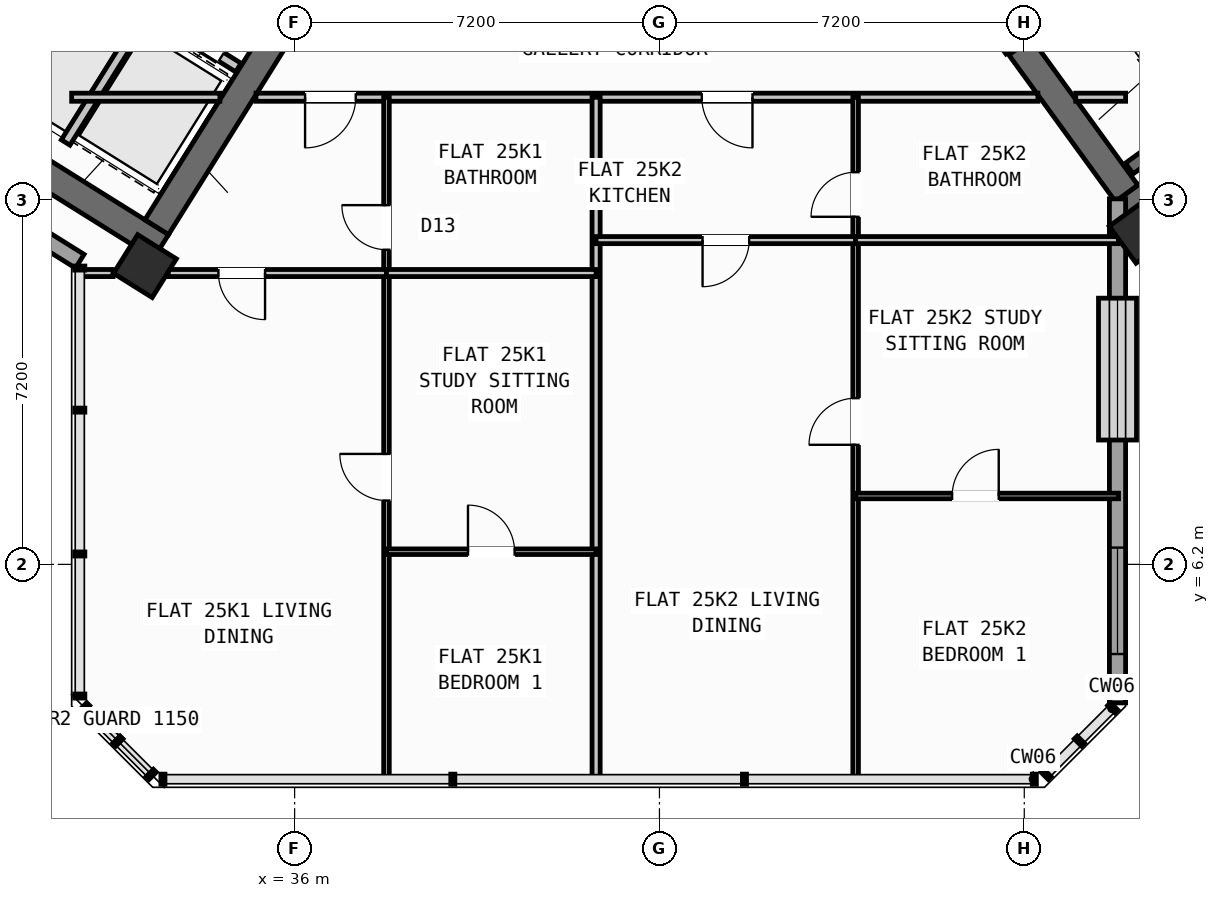
"""IFC4 building model, lengths in metres.
Left out: names, types, materials, properties, quantities, classifications, styles, units other than length and angle.
Written with IfcOpenShell. Run it as: python <this file> out.ifc"""

import sys

from ifc_helpers import new_model, si_unit, direction, frame, frame_2d, origin, origin_2d, place, context, subcontext, project, spatial, rectangle, hollow_rectangle, extrude, source, transform, mapped, element, fill, save


model = new_model("IFC4")
c1 = context("Model", 3, precision=1e-05, world=origin(), true_north=direction((0.0, 1.0)))
c2 = subcontext(c1, "Body", "Model", "MODEL_VIEW")
j1 = project(units=[si_unit("LENGTHUNIT", "METRE"), si_unit("PLANEANGLEUNIT", "RADIAN")], contexts=[c1])
p1 = place(None, origin())
s1 = spatial("IfcSite", under=j1, at=p1, CompositionType="ELEMENT")
p2 = place(p1, origin())
s2 = spatial("IfcBuilding", under=s1, at=p2, CompositionType="ELEMENT")
p3 = place(p2, frame((0.0, 0.0, 100.8)))
s3 = spatial("IfcBuildingStorey", under=s2, at=p3, CompositionType="ELEMENT", Elevation=100.8)
p4 = place(p3, frame((33.366, 12.477, 0.0), z_axis=(0.0, 0.0, 1.0), x_axis=(-0.848047359947, 0.529920442413, 0.0)))
e1 = element("IfcWall", 1, at=p4, inside=s3, PredefinedType="SHEAR", context=c2, shape_type="SweptSolid", body=[
    extrude(rectangle(XDim=13.14, YDim=0.55, at=frame_2d((6.57, 0.0))), origin(), (0.0, 0.0, 1.0), 4.25),
])
p5 = place(p3, frame((36.683, 18.304, 0.0), z_axis=(0.0, 0.0, 1.0), x_axis=(-0.529896466841, -0.848062341122, 0.0)))
e2 = element("IfcWall", 2, at=p5, inside=s3, PredefinedType="SHEAR", context=c2, shape_type="SweptSolid", body=[
    extrude(rectangle(XDim=6.425, YDim=0.55, at=frame_2d((3.212, 0.0))), origin(), (0.0, 0.0, 1.0), 4.25),
])
p6 = place(p3, frame((52.359, 13.14, 0.0), z_axis=(0.0, 0.0, 1.0), x_axis=(0.809014896919, 0.587788139183, 0.0)))
e3 = element("IfcWall", 3, at=p6, inside=s3, PredefinedType="SHEAR", context=c2, shape_type="SweptSolid", body=[
    extrude(rectangle(XDim=12.34, YDim=0.55, at=frame_2d((6.17, 0.0))), origin(), (0.0, 0.0, 1.0), 4.25),
])
p7 = place(p3, frame((52.42, 13.524, 0.0), z_axis=(0.0, 0.0, 1.0), x_axis=(-0.587802113096, 0.809004744015, 0.0)))
e4 = element("IfcWall", 4, at=p7, inside=s3, PredefinedType="SHEAR", context=c2, shape_type="SweptSolid", body=[
    extrude(rectangle(XDim=3.575, YDim=0.55, at=frame_2d((1.788, 0.0))), origin(), (0.0, 0.0, 1.0), 4.25),
])
m1 = source(origin(), c2, "Body", "SweptSolid", [
    extrude(hollow_rectangle(XDim=0.9, YDim=0.9, WallThickness=0.036, at=origin_2d()), origin(), (0.0, 0.0, 1.0), 4.5),
])
for number, where, z_axis, x_axis in (
    (5, (33.046, 12.087, 0.0), (0.0, 0.0, 1.0), (-0.848, 0.53, 0.0)),
    (6, (52.705, 12.773, 0.0), (0.0, 0.0, 1.0), (0.809, 0.588, 0.0)),
):
    element("IfcColumn", number, at=place(p3, frame(where, z_axis=z_axis, x_axis=x_axis)), inside=s3, PredefinedType="COLUMN", context=c2, shape_type="MappedRepresentation", body=[
        mapped(m1, transform((0.0, 0.0, 0.0), scale=1.0)),
    ])
p8 = place(p3, frame((31.76, 12.183, 0.0), z_axis=(0.0, 0.0, 1.0), x_axis=(-0.848047074256, 0.529920899612, 0.0)))
e7 = element("IfcWall", 7, at=p8, inside=s3, PredefinedType="STANDARD", context=c2, shape_type="SweptSolid", body=[
    extrude(rectangle(XDim=30.652, YDim=0.32, at=frame_2d((15.326, 0.0))), origin(), (0.0, 0.0, 1.0), 4.25),
])
p9 = place(p8, frame((15.153, 0.0, 0.0)))
e8 = element("IfcOpeningElement", 8, at=p9, cuts=e7, PredefinedType="OPENING", context=c2, shape_type="SweptSolid", body=[
    extrude(rectangle(XDim=1.2, YDim=2.15, at=frame_2d((0.6, 1.075))), frame((0.0, 0.17, 0.0), z_axis=(0.0, -1.0, 0.0), x_axis=(1.0, 0.0, 0.0)), (0.0, 0.0, 1.0), 0.34),
])
p10 = place(p8, frame((1.652, 0.0, 0.65)))
e9 = element("IfcOpeningElement", 9, at=p10, cuts=e7, PredefinedType="OPENING", context=c2, shape_type="SweptSolid", body=[
    extrude(rectangle(XDim=2.8, YDim=2.1, at=frame_2d((1.4, 1.05))), frame((0.0, 0.17, 0.0), z_axis=(0.0, -1.0, 0.0), x_axis=(1.0, 0.0, 0.0)), (0.0, 0.0, 1.0), 0.34),
])
p11 = place(p8, frame((6.856, 0.0, 0.65)))
e10 = element("IfcOpeningElement", 10, at=p11, cuts=e7, PredefinedType="OPENING", context=c2, shape_type="SweptSolid", body=[
    extrude(rectangle(XDim=2.8, YDim=2.1, at=frame_2d((1.4, 1.05))), frame((0.0, 0.17, 0.0), z_axis=(0.0, -1.0, 0.0), x_axis=(1.0, 0.0, 0.0)), (0.0, 0.0, 1.0), 0.34),
])
p12 = place(p8, frame((20.478, 0.0, 0.85)))
e11 = element("IfcOpeningElement", 11, at=p12, cuts=e7, PredefinedType="OPENING", context=c2, shape_type="SweptSolid", body=[
    extrude(rectangle(XDim=1.5, YDim=1.5, at=frame_2d((0.75, 0.75))), frame((0.0, 0.17, 0.0), z_axis=(0.0, -1.0, 0.0), x_axis=(1.0, 0.0, 0.0)), (0.0, 0.0, 1.0), 0.34),
])
p13 = place(p8, frame((26.258, 0.0, 0.65)))
e12 = element("IfcOpeningElement", 12, at=p13, cuts=e7, PredefinedType="OPENING", context=c2, shape_type="SweptSolid", body=[
    extrude(rectangle(XDim=2.8, YDim=2.1, at=frame_2d((1.4, 1.05))), frame((0.0, 0.17, 0.0), z_axis=(0.0, -1.0, 0.0), x_axis=(1.0, 0.0, 0.0)), (0.0, 0.0, 1.0), 0.34),
])
p14 = place(p3, frame((52.24, 13.414, 0.0), z_axis=(0.0, 0.0, 1.0), x_axis=(0.0, -1.0, 0.0)))
e13 = element("IfcWall", 13, at=p14, inside=s3, PredefinedType="STANDARD", context=c2, shape_type="SweptSolid", body=[
    extrude(rectangle(XDim=9.948, YDim=0.32, at=frame_2d((4.974, 0.0))), origin(), (0.0, 0.0, 1.0), 4.25),
])
p15 = place(p14, frame((1.96, 0.0, 0.65)))
e14 = element("IfcOpeningElement", 14, at=p15, cuts=e13, PredefinedType="OPENING", context=c2, shape_type="SweptSolid", body=[
    extrude(rectangle(XDim=2.8, YDim=2.1, at=frame_2d((1.4, 1.05))), frame((0.0, 0.17, 0.0), z_axis=(0.0, -1.0, 0.0), x_axis=(1.0, 0.0, 0.0)), (0.0, 0.0, 1.0), 0.34),
])
p16 = place(p14, frame((6.883, 0.0, 0.8)))
e15 = element("IfcOpeningElement", 15, at=p16, cuts=e13, PredefinedType="OPENING", context=c2, shape_type="SweptSolid", body=[
    extrude(rectangle(XDim=2.1, YDim=1.55, at=frame_2d((1.05, 0.775))), frame((0.0, 0.17, 0.0), z_axis=(0.0, -1.0, 0.0), x_axis=(1.0, 0.0, 0.0)), (0.0, 0.0, 1.0), 0.34),
])
p17 = place(p3, frame((31.288, 18.256, 0.0), z_axis=(0.0, 0.0, 1.0), x_axis=(-0.529943379326, -0.848033026897, 0.0)))
e16 = element("IfcWall", 16, at=p17, inside=s3, PredefinedType="SHEAR", context=c2, shape_type="SweptSolid", body=[
    extrude(rectangle(XDim=3.16, YDim=0.26, at=frame_2d((1.58, 0.0))), origin(), (0.0, 0.0, 1.0), 4.25),
])
p18 = place(p3, frame((34.891, 16.005, 0.0), z_axis=(0.0, 0.0, 1.0), x_axis=(-0.848062873452, 0.529895614884, 0.0)))
e17 = element("IfcWall", 17, at=p18, inside=s3, PredefinedType="STANDARD", context=c2, shape_type="SweptSolid", body=[
    extrude(rectangle(XDim=4.248, YDim=0.2, at=frame_2d((2.124, 0.0))), origin(), (0.0, 0.0, 1.0), 4.24),
])
p19 = place(p18, frame((0.398, 0.0, 0.0)))
e18 = element("IfcOpeningElement", 18, at=p19, cuts=e17, PredefinedType="OPENING", context=c2, shape_type="SweptSolid", body=[
    extrude(rectangle(XDim=1.3, YDim=2.2, at=frame_2d((0.65, 1.1))), frame((0.0, 0.11, 0.0), z_axis=(0.0, -1.0, 0.0), x_axis=(1.0, 0.0, 0.0)), (0.0, 0.0, 1.0), 0.22),
])
p20 = place(p18, frame((2.473, 0.0, 0.0)))
e19 = element("IfcOpeningElement", 19, at=p20, cuts=e17, PredefinedType="OPENING", context=c2, shape_type="SweptSolid", body=[
    extrude(rectangle(XDim=1.45, YDim=2.25, at=frame_2d((0.725, 1.125))), frame((0.0, 0.11, 0.0), z_axis=(0.0, -1.0, 0.0), x_axis=(1.0, 0.0, 0.0)), (0.0, 0.0, 1.0), 0.22),
])
p21 = place(p3, frame((33.029, 17.003, 0.0), z_axis=(0.0, 0.0, 1.0), x_axis=(-0.529916267533, -0.848049968695, 0.0)))
e20 = element("IfcWall", 20, at=p21, inside=s3, PredefinedType="STANDARD", context=c2, shape_type="SweptSolid", body=[
    extrude(rectangle(XDim=2.92, YDim=0.2, at=frame_2d((1.46, 0.0))), origin(), (0.0, 0.0, 1.0), 4.24),
])
p22 = place(p3, frame((52.472, 14.013, 0.0), z_axis=(0.0, 0.0, 1.0), x_axis=(0.809028366311, 0.587769599847, 0.0)))
e21 = element("IfcWall", 21, at=p22, inside=s3, PredefinedType="SHEAR", context=c2, shape_type="SweptSolid", body=[
    extrude(rectangle(XDim=7.33, YDim=0.26, at=frame_2d((3.665, 0.0))), origin(), (0.0, 0.0, 1.0), 4.25),
])
p23 = place(p3, frame((31.6, 15.42, 0.0), z_axis=(0.0, 0.0, 1.0), x_axis=(1.0, 0.0, 0.0)))
e22 = element("IfcWall", 22, at=p23, inside=s3, PredefinedType="PARTITIONING", context=c2, shape_type="SweptSolid", body=[
    extrude(rectangle(XDim=2.925, YDim=0.16, at=frame_2d((1.462, 0.0))), origin(), (0.0, 0.0, 1.0), 4.24),
])
p24 = place(p3, frame((35.237, 15.42, 0.0), z_axis=(0.0, 0.0, 1.0), x_axis=(1.0, 0.0, 0.0)))
e23 = element("IfcWall", 23, at=p24, inside=s3, PredefinedType="PARTITIONING", context=c2, shape_type="SweptSolid", body=[
    extrude(rectangle(XDim=15.432, YDim=0.16, at=frame_2d((7.716, 0.0))), origin(), (0.0, 0.0, 1.0), 4.24),
])
p25 = place(p24, frame((0.969, 0.0, 0.0)))
e24 = element("IfcOpeningElement", 24, at=p25, cuts=e23, PredefinedType="OPENING", context=c2, shape_type="SweptSolid", body=[
    extrude(rectangle(XDim=1.0, YDim=2.1, at=frame_2d((0.5, 1.05))), frame((0.0, 0.09, 0.0), z_axis=(0.0, -1.0, 0.0), x_axis=(1.0, 0.0, 0.0)), (0.0, 0.0, 1.0), 0.18),
])
p26 = place(p24, frame((8.799, 0.0, 0.0)))
e25 = element("IfcOpeningElement", 25, at=p26, cuts=e23, PredefinedType="OPENING", context=c2, shape_type="SweptSolid", body=[
    extrude(rectangle(XDim=1.0, YDim=2.1, at=frame_2d((0.5, 1.05))), frame((0.0, 0.09, 0.0), z_axis=(0.0, -1.0, 0.0), x_axis=(1.0, 0.0, 0.0)), (0.0, 0.0, 1.0), 0.18),
])
p27 = place(p3, frame((51.416, 15.42, 0.0), z_axis=(0.0, 0.0, 1.0), x_axis=(1.0, 0.0, 0.0)))
e26 = element("IfcWall", 26, at=p27, inside=s3, PredefinedType="PARTITIONING", context=c2, shape_type="SweptSolid", body=[
    extrude(rectangle(XDim=0.984, YDim=0.16, at=frame_2d((0.492, 0.0))), origin(), (0.0, 0.0, 1.0), 4.24),
])
p28 = place(p3, frame((50.119, 16.333, 0.0), z_axis=(0.0, 0.0, 1.0), x_axis=(-0.587749856981, 0.809042709391, 0.0)))
e27 = element("IfcWall", 27, at=p28, inside=s3, PredefinedType="STANDARD", context=c2, shape_type="SweptSolid", body=[
    extrude(rectangle(XDim=2.96, YDim=0.2, at=frame_2d((1.48, 0.0))), origin(), (0.0, 0.0, 1.0), 4.24),
])
p29 = place(p28, frame((0.53, 0.0, 0.0)))
e28 = element("IfcOpeningElement", 28, at=p29, cuts=e27, PredefinedType="OPENING", context=c2, shape_type="SweptSolid", body=[
    extrude(rectangle(XDim=1.5, YDim=2.15, at=frame_2d((0.75, 1.075))), frame((0.0, 0.11, 0.0), z_axis=(0.0, -1.0, 0.0), x_axis=(1.0, 0.0, 0.0)), (0.0, 0.0, 1.0), 0.22),
])
p30 = place(p3, frame((41.95, 1.96, 0.0), z_axis=(0.0, 0.0, 1.0), x_axis=(0.0, 1.0, 0.0)))
e29 = element("IfcWall", 29, at=p30, inside=s3, PredefinedType="PARTITIONING", context=c2, shape_type="SweptSolid", body=[
    extrude(rectangle(XDim=13.46, YDim=0.16, at=frame_2d((6.73, 0.0))), origin(), (0.0, 0.0, 1.0), 4.24),
])
p31 = place(p3, frame((37.813, 1.96, 0.0), z_axis=(0.0, 0.0, 1.0), x_axis=(0.0, 1.0, 0.0)))
e30 = element("IfcWall", 30, at=p31, inside=s3, PredefinedType="PARTITIONING", context=c2, shape_type="SweptSolid", body=[
    extrude(rectangle(XDim=13.46, YDim=0.11, at=frame_2d((6.73, 0.0))), origin(), (0.0, 0.0, 1.0), 4.24),
])
p32 = place(p31, frame((5.5, 0.0, 0.0)))
e31 = element("IfcOpeningElement", 31, at=p32, cuts=e30, PredefinedType="OPENING", context=c2, shape_type="SweptSolid", body=[
    extrude(rectangle(XDim=0.92, YDim=2.08, at=frame_2d((0.46, 1.04))), frame((0.0, 0.065, 0.0), z_axis=(0.0, -1.0, 0.0), x_axis=(1.0, 0.0, 0.0)), (0.0, 0.0, 1.0), 0.13),
])
p33 = place(p31, frame((10.45, 0.0, 0.0)))
e32 = element("IfcOpeningElement", 32, at=p33, cuts=e30, PredefinedType="OPENING", context=c2, shape_type="SweptSolid", body=[
    extrude(rectangle(XDim=0.88, YDim=2.08, at=frame_2d((0.44, 1.04))), frame((0.0, 0.065, 0.0), z_axis=(0.0, -1.0, 0.0), x_axis=(1.0, 0.0, 0.0)), (0.0, 0.0, 1.0), 0.13),
])
p34 = place(p3, frame((31.74, 11.95, 0.0), z_axis=(0.0, 0.0, 1.0), x_axis=(1.0, 0.0, 0.0)))
e33 = element("IfcWall", 33, at=p34, inside=s3, PredefinedType="PLUMBINGWALL", context=c2, shape_type="SweptSolid", body=[
    extrude(rectangle(XDim=0.676, YDim=0.14, at=frame_2d((0.338, 0.0))), origin(), (0.0, 0.0, 1.0), 4.24),
])
p35 = place(p3, frame((33.505, 11.95, 0.0), z_axis=(0.0, 0.0, 1.0), x_axis=(1.0, 0.0, 0.0)))
e34 = element("IfcWall", 34, at=p35, inside=s3, PredefinedType="PLUMBINGWALL", context=c2, shape_type="SweptSolid", body=[
    extrude(rectangle(XDim=4.308, YDim=0.14, at=frame_2d((2.154, 0.0))), origin(), (0.0, 0.0, 1.0), 3.425),
])
p36 = place(p35, frame((0.991, 0.0, 0.0)))
e35 = element("IfcOpeningElement", 35, at=p36, cuts=e34, PredefinedType="OPENING", context=c2, shape_type="SweptSolid", body=[
    extrude(rectangle(XDim=0.92, YDim=2.08, at=frame_2d((0.46, 1.04))), frame((0.0, 0.08, 0.0), z_axis=(0.0, -1.0, 0.0), x_axis=(1.0, 0.0, 0.0)), (0.0, 0.0, 1.0), 0.16),
])
p37 = place(p3, frame((37.813, 11.95, 0.0), z_axis=(0.0, 0.0, 1.0), x_axis=(1.0, 0.0, 0.0)))
e36 = element("IfcWall", 36, at=p37, inside=s3, PredefinedType="PLUMBINGWALL", context=c2, shape_type="SweptSolid", body=[
    extrude(rectangle(XDim=4.137, YDim=0.14, at=frame_2d((2.068, 0.0))), origin(), (0.0, 0.0, 1.0), 3.425),
])
p38 = place(p3, frame((37.813, 6.45, 0.0), z_axis=(0.0, 0.0, 1.0), x_axis=(1.0, 0.0, 0.0)))
e37 = element("IfcWall", 37, at=p38, inside=s3, PredefinedType="PARTITIONING", context=c2, shape_type="SweptSolid", body=[
    extrude(rectangle(XDim=4.137, YDim=0.11, at=frame_2d((2.068, 0.0))), origin(), (0.0, 0.0, 1.0), 4.24),
])
p39 = place(p38, frame((1.608, 0.0, 0.0)))
e38 = element("IfcOpeningElement", 38, at=p39, cuts=e37, PredefinedType="OPENING", context=c2, shape_type="SweptSolid", body=[
    extrude(rectangle(XDim=0.92, YDim=2.08, at=frame_2d((0.46, 1.04))), frame((0.0, 0.065, 0.0), z_axis=(0.0, -1.0, 0.0), x_axis=(1.0, 0.0, 0.0)), (0.0, 0.0, 1.0), 0.13),
])
p40 = place(p3, frame((47.072, 1.96, 0.0), z_axis=(0.0, 0.0, 1.0), x_axis=(0.0, 1.0, 0.0)))
e39 = element("IfcWall", 39, at=p40, inside=s3, PredefinedType="PARTITIONING", context=c2, shape_type="SweptSolid", body=[
    extrude(rectangle(XDim=13.46, YDim=0.11, at=frame_2d((6.73, 0.0))), origin(), (0.0, 0.0, 1.0), 4.24),
])
p41 = place(p40, frame((6.6, 0.0, 0.0)))
e40 = element("IfcOpeningElement", 40, at=p41, cuts=e39, PredefinedType="OPENING", context=c2, shape_type="SweptSolid", body=[
    extrude(rectangle(XDim=0.92, YDim=2.08, at=frame_2d((0.46, 1.04))), frame((0.0, 0.065, 0.0), z_axis=(0.0, -1.0, 0.0), x_axis=(1.0, 0.0, 0.0)), (0.0, 0.0, 1.0), 0.13),
])
p42 = place(p40, frame((11.1, 0.0, 0.0)))
e41 = element("IfcOpeningElement", 41, at=p42, cuts=e39, PredefinedType="OPENING", context=c2, shape_type="SweptSolid", body=[
    extrude(rectangle(XDim=0.88, YDim=2.08, at=frame_2d((0.44, 1.04))), frame((0.0, 0.065, 0.0), z_axis=(0.0, -1.0, 0.0), x_axis=(1.0, 0.0, 0.0)), (0.0, 0.0, 1.0), 0.13),
])
p43 = place(p3, frame((41.95, 12.6, 0.0), z_axis=(0.0, 0.0, 1.0), x_axis=(1.0, 0.0, 0.0)))
e42 = element("IfcWall", 42, at=p43, inside=s3, PredefinedType="PLUMBINGWALL", context=c2, shape_type="SweptSolid", body=[
    extrude(rectangle(XDim=5.122, YDim=0.14, at=frame_2d((2.561, 0.0))), origin(), (0.0, 0.0, 1.0), 3.425),
])
p44 = place(p43, frame((2.101, 0.0, 0.0)))
e43 = element("IfcOpeningElement", 43, at=p44, cuts=e42, PredefinedType="OPENING", context=c2, shape_type="SweptSolid", body=[
    extrude(rectangle(XDim=0.92, YDim=2.08, at=frame_2d((0.46, 1.04))), frame((0.0, 0.08, 0.0), z_axis=(0.0, -1.0, 0.0), x_axis=(1.0, 0.0, 0.0)), (0.0, 0.0, 1.0), 0.16),
])
p45 = place(p3, frame((47.072, 12.6, 0.0), z_axis=(0.0, 0.0, 1.0), x_axis=(1.0, 0.0, 0.0)))
e44 = element("IfcWall", 44, at=p45, inside=s3, PredefinedType="PLUMBINGWALL", context=c2, shape_type="SweptSolid", body=[
    extrude(rectangle(XDim=5.188, YDim=0.14, at=frame_2d((2.594, 0.0))), origin(), (0.0, 0.0, 1.0), 3.425),
])
p46 = place(p3, frame((47.072, 7.55, 0.0), z_axis=(0.0, 0.0, 1.0), x_axis=(1.0, 0.0, 0.0)))
e45 = element("IfcWall", 45, at=p46, inside=s3, PredefinedType="PARTITIONING", context=c2, shape_type="SweptSolid", body=[
    extrude(rectangle(XDim=5.188, YDim=0.11, at=frame_2d((2.594, 0.0))), origin(), (0.0, 0.0, 1.0), 4.24),
])
p47 = place(p46, frame((1.904, 0.0, 0.0)))
e46 = element("IfcOpeningElement", 46, at=p47, cuts=e45, PredefinedType="OPENING", context=c2, shape_type="SweptSolid", body=[
    extrude(rectangle(XDim=0.92, YDim=2.08, at=frame_2d((0.46, 1.04))), frame((0.0, 0.065, 0.0), z_axis=(0.0, -1.0, 0.0), x_axis=(1.0, 0.0, 0.0)), (0.0, 0.0, 1.0), 0.13),
])
m2 = source(origin(), c2, "Body", "SweptSolid", [
    extrude(rectangle(XDim=2.8, YDim=2.1, at=frame_2d((1.4, 1.05))), frame((0.0, 0.03, 0.0), z_axis=(0.0, -1.0, 0.0), x_axis=(1.0, 0.0, 0.0)), (0.0, 0.0, 1.0), 0.06),
])
p48 = place(p15, origin())
e47 = element("IfcWindow", 47, at=p48, inside=s3, PartitioningType="SINGLE_PANEL", PredefinedType="WINDOW", context=c2, shape_type="MappedRepresentation", body=[
    mapped(m2, transform((0.0, 0.0, 0.0), scale=1.0)),
])
fill(e14, e47)
m3 = source(origin(), c2, "Body", "SweptSolid", [
    extrude(rectangle(XDim=2.1, YDim=1.55, at=frame_2d((1.05, 0.775))), frame((0.0, 0.03, 0.0), z_axis=(0.0, -1.0, 0.0), x_axis=(1.0, 0.0, 0.0)), (0.0, 0.0, 1.0), 0.06),
])
p49 = place(p16, origin())
e48 = element("IfcWindow", 48, at=p49, inside=s3, PartitioningType="SINGLE_PANEL", PredefinedType="WINDOW", context=c2, shape_type="MappedRepresentation", body=[
    mapped(m3, transform((0.0, 0.0, 0.0), scale=1.0)),
])
fill(e15, e48)
m4 = source(origin(), c2, "Body", "SweptSolid", [
    extrude(rectangle(XDim=1.3, YDim=2.2, at=frame_2d((0.65, 1.1))), frame((0.0, 0.025, 0.0), z_axis=(0.0, -1.0, 0.0), x_axis=(1.0, 0.0, 0.0)), (0.0, 0.0, 1.0), 0.05),
])
p50 = place(p19, origin())
e49 = element("IfcDoor", 49, at=p50, inside=s3, OperationType="DOUBLE_DOOR_SLIDING", PredefinedType="DOOR", context=c2, shape_type="MappedRepresentation", body=[
    mapped(m4, transform((0.0, 0.0, 0.0), scale=1.0)),
])
fill(e18, e49)
m5 = source(origin(), c2, "Body", "SweptSolid", [
    extrude(rectangle(XDim=0.92, YDim=2.08, at=frame_2d((0.46, 1.04))), frame((0.0, 0.025, 0.0), z_axis=(0.0, -1.0, 0.0), x_axis=(1.0, 0.0, 0.0)), (0.0, 0.0, 1.0), 0.05),
])
p51 = place(p32, origin())
e50 = element("IfcDoor", 50, at=p51, inside=s3, OperationType="SINGLE_SWING_RIGHT", PredefinedType="DOOR", context=c2, shape_type="MappedRepresentation", body=[
    mapped(m5, transform((0.0, 0.0, 0.0), scale=1.0)),
])
fill(e31, e50)
p52 = place(p39, origin())
e51 = element("IfcDoor", 51, at=p52, inside=s3, OperationType="SINGLE_SWING_LEFT", PredefinedType="DOOR", context=c2, shape_type="MappedRepresentation", body=[
    mapped(m5, transform((0.0, 0.0, 0.0), scale=1.0)),
])
fill(e38, e51)
m6 = source(origin(), c2, "Body", "SweptSolid", [
    extrude(rectangle(XDim=1.0, YDim=2.1, at=frame_2d((0.5, 1.05))), frame((0.0, 0.025, 0.0), z_axis=(0.0, -1.0, 0.0), x_axis=(1.0, 0.0, 0.0)), (0.0, 0.0, 1.0), 0.05),
])
p53 = place(p25, frame((1.0, 0.0, 0.0), z_axis=(0.0, 0.0, 1.0), x_axis=(-1.0, 0.0, 0.0)))
e52 = element("IfcDoor", 52, at=p53, inside=s3, OperationType="SINGLE_SWING_RIGHT", PredefinedType="DOOR", context=c2, shape_type="MappedRepresentation", body=[
    mapped(m6, transform((0.0, 0.0, 0.0), scale=1.0)),
])
fill(e24, e52)
p54 = place(p36, frame((0.92, 0.0, 0.0), z_axis=(0.0, 0.0, 1.0), x_axis=(-1.0, 0.0, 0.0)))
e53 = element("IfcDoor", 53, at=p54, inside=s3, OperationType="SINGLE_SWING_LEFT", PredefinedType="DOOR", context=c2, shape_type="MappedRepresentation", body=[
    mapped(m5, transform((0.0, 0.0, 0.0), scale=1.0)),
])
fill(e35, e53)
m7 = source(origin(), c2, "Body", "SweptSolid", [
    extrude(rectangle(XDim=0.88, YDim=2.08, at=frame_2d((0.44, 1.04))), frame((0.0, 0.025, 0.0), z_axis=(0.0, -1.0, 0.0), x_axis=(1.0, 0.0, 0.0)), (0.0, 0.0, 1.0), 0.05),
])
p55 = place(p33, origin())
e54 = element("IfcDoor", 54, at=p55, inside=s3, OperationType="SINGLE_SWING_RIGHT", PredefinedType="DOOR", context=c2, shape_type="MappedRepresentation", body=[
    mapped(m7, transform((0.0, 0.0, 0.0), scale=1.0)),
])
fill(e32, e54)
p56 = place(p41, origin())
e55 = element("IfcDoor", 55, at=p56, inside=s3, OperationType="SINGLE_SWING_LEFT", PredefinedType="DOOR", context=c2, shape_type="MappedRepresentation", body=[
    mapped(m5, transform((0.0, 0.0, 0.0), scale=1.0)),
])
fill(e40, e55)
p57 = place(p47, origin())
e56 = element("IfcDoor", 56, at=p57, inside=s3, OperationType="SINGLE_SWING_RIGHT", PredefinedType="DOOR", context=c2, shape_type="MappedRepresentation", body=[
    mapped(m5, transform((0.0, 0.0, 0.0), scale=1.0)),
])
fill(e46, e56)
p58 = place(p26, frame((1.0, 0.0, 0.0), z_axis=(0.0, 0.0, 1.0), x_axis=(-1.0, 0.0, 0.0)))
e57 = element("IfcDoor", 57, at=p58, inside=s3, OperationType="SINGLE_SWING_LEFT", PredefinedType="DOOR", context=c2, shape_type="MappedRepresentation", body=[
    mapped(m6, transform((0.0, 0.0, 0.0), scale=1.0)),
])
fill(e25, e57)
p59 = place(p44, frame((0.92, 0.0, 0.0), z_axis=(0.0, 0.0, 1.0), x_axis=(-1.0, 0.0, 0.0)))
e58 = element("IfcDoor", 58, at=p59, inside=s3, OperationType="SINGLE_SWING_RIGHT", PredefinedType="DOOR", context=c2, shape_type="MappedRepresentation", body=[
    mapped(m5, transform((0.0, 0.0, 0.0), scale=1.0)),
])
fill(e43, e58)
p60 = place(p42, origin())
e59 = element("IfcDoor", 59, at=p60, inside=s3, OperationType="SINGLE_SWING_LEFT", PredefinedType="DOOR", context=c2, shape_type="MappedRepresentation", body=[
    mapped(m7, transform((0.0, 0.0, 0.0), scale=1.0)),
])
fill(e41, e59)
save(model, sys.argv[1])
